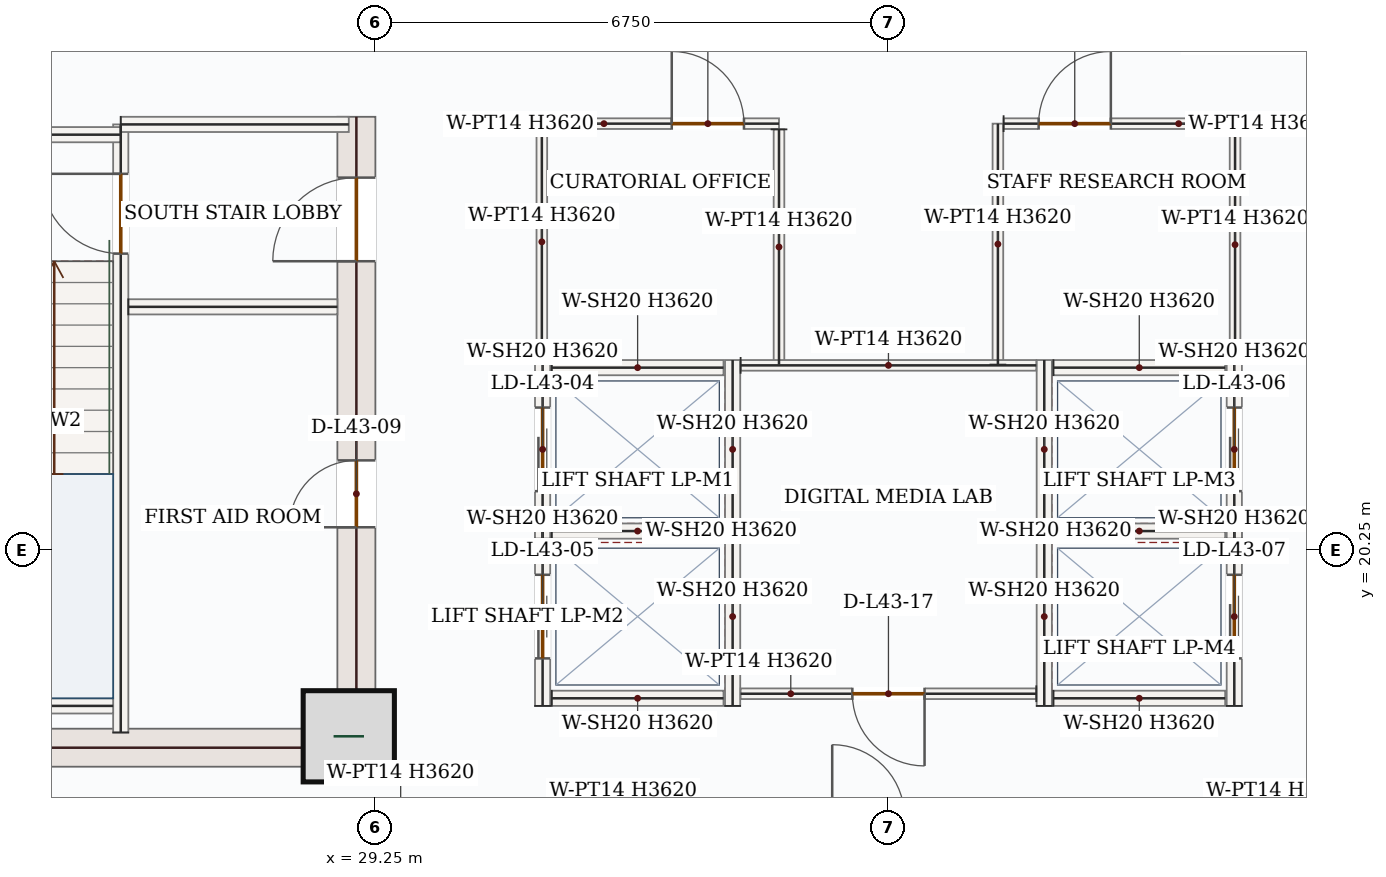
"""IFC4 building model, lengths in metres.
Left out: names, types, materials, properties, quantities, classifications, styles, units other than length and angle.
Written with IfcOpenShell. Run it as: python <this file> out.ifc"""

import sys

from ifc_helpers import new_model, si_unit, direction, frame, frame_2d, origin, origin_2d, place, context, subcontext, project, spatial, rectangle, extrude, source, transform, mapped, element, fill, save


model = new_model("IFC4")
c1 = context("Model", 3, precision=1e-05, world=origin(), true_north=direction((0.0, 1.0)))
c2 = subcontext(c1, "Body", "Model", "MODEL_VIEW")
j1 = project(units=[si_unit("LENGTHUNIT", "METRE"), si_unit("PLANEANGLEUNIT", "RADIAN")], contexts=[c1])
p1 = place(None, origin())
s1 = spatial("IfcSite", under=j1, at=p1, CompositionType="ELEMENT")
p2 = place(p1, origin())
s2 = spatial("IfcBuilding", under=s1, at=p2, CompositionType="ELEMENT")
p3 = place(p2, frame((0.0, 0.0, 186.3)))
s3 = spatial("IfcBuildingStorey", under=s2, at=p3, CompositionType="ELEMENT", Elevation=186.3)
p4 = place(p3, frame((29.0, 17.4, 0.0), z_axis=(0.0, 0.0, 1.0), x_axis=(0.0, 1.0, 0.0)))
e1 = element("IfcWall", 1, at=p4, inside=s3, PredefinedType="SHEAR", context=c2, shape_type="SweptSolid", body=[
    extrude(rectangle(XDim=8.55, YDim=0.5, at=frame_2d((4.275, 0.0))), origin(), (0.0, 0.0, 1.0), 3.62),
])
p5 = place(p4, frame((6.65, 0.0, 0.0)))
e2 = element("IfcOpeningElement", 2, at=p5, cuts=e1, PredefinedType="OPENING", context=c2, shape_type="SweptSolid", body=[
    extrude(rectangle(XDim=1.1, YDim=2.2, at=frame_2d((0.55, 1.1))), frame((0.0, 0.26, 0.0), z_axis=(0.0, -1.0, 0.0), x_axis=(1.0, 0.0, 0.0)), (0.0, 0.0, 1.0), 0.52),
])
p6 = place(p4, frame((3.15, 0.0, 0.0)))
e3 = element("IfcOpeningElement", 3, at=p6, cuts=e1, PredefinedType="OPENING", context=c2, shape_type="SweptSolid", body=[
    extrude(rectangle(XDim=0.88, YDim=2.1, at=frame_2d((0.44, 1.05))), frame((0.0, 0.26, 0.0), z_axis=(0.0, -1.0, 0.0), x_axis=(1.0, 0.0, 0.0)), (0.0, 0.0, 1.0), 0.52),
])
m1 = source(origin(), c2, "Body", "SweptSolid", [
    extrude(rectangle(XDim=7.0, YDim=0.5, at=frame_2d((3.5, 0.0))), origin(), (0.0, 0.0, 1.0), 3.62),
])
p7 = place(p3, frame((21.75, 17.65, 0.0), z_axis=(0.0, 0.0, 1.0), x_axis=(1.0, 0.0, 0.0)))
e4 = element("IfcWall", 4, at=p7, inside=s3, PredefinedType="SHEAR", context=c2, shape_type="MappedRepresentation", body=[
    mapped(m1, transform((0.0, 0.0, 0.0), x_axis=(1.0, 0.0, 0.0), y_axis=(0.0, 1.0, 0.0), z_axis=(0.0, 0.0, 1.0), scale=1.0)),
])
m2 = source(origin(), c2, "Body", "SweptSolid", [
    extrude(rectangle(XDim=1.2, YDim=1.2, at=origin_2d()), origin(), (0.0, 0.0, 1.0), 3.9),
])
p8 = place(p3, frame((28.9, 17.8, 0.0), z_axis=(0.0, 0.0, 1.0), x_axis=(1.0, 0.0, 0.0)))
e5 = element("IfcColumn", 5, at=p8, inside=s3, PredefinedType="COLUMN", context=c2, shape_type="MappedRepresentation", body=[
    mapped(m2, transform((0.0, 0.0, 0.0), x_axis=(1.0, 0.0, 0.0), y_axis=(0.0, 1.0, 0.0), z_axis=(0.0, 0.0, 1.0), scale=1.0)),
])
p9 = place(p3, frame((25.9, 17.85, 0.0), z_axis=(0.0, 0.0, 1.0), x_axis=(0.0, 1.0, 0.0)))
e6 = element("IfcWall", 6, at=p9, inside=s3, PredefinedType="SOLIDWALL", context=c2, shape_type="SweptSolid", body=[
    extrude(rectangle(XDim=8.0, YDim=0.2, at=frame_2d((4.0, 0.0))), origin(), (0.0, 0.0, 1.0), 3.62),
])
p10 = place(p9, frame((6.3, 0.0, 0.0)))
e7 = element("IfcOpeningElement", 7, at=p10, cuts=e6, PredefinedType="OPENING", context=c2, shape_type="SweptSolid", body=[
    extrude(rectangle(XDim=1.05, YDim=2.15, at=frame_2d((0.525, 1.075))), frame((0.0, 0.11, 0.0), z_axis=(0.0, -1.0, 0.0), x_axis=(1.0, 0.0, 0.0)), (0.0, 0.0, 1.0), 0.22),
])
m3 = source(origin(), c2, "Body", "SweptSolid", [
    extrude(rectangle(XDim=4.25, YDim=0.2, at=frame_2d((2.125, 0.0))), origin(), (0.0, 0.0, 1.0), 3.62),
])
p11 = place(p3, frame((21.65, 25.715, 0.0), z_axis=(0.0, 0.0, 1.0), x_axis=(1.0, 0.0, 0.0)))
e8 = element("IfcWall", 8, at=p11, inside=s3, PredefinedType="SOLIDWALL", context=c2, shape_type="MappedRepresentation", body=[
    mapped(m3, transform((0.0, 0.0, 0.0), x_axis=(1.0, 0.0, 0.0), y_axis=(0.0, 1.0, 0.0), z_axis=(0.0, 0.0, 1.0), scale=1.0)),
])
m4 = source(origin(), c2, "Body", "SweptSolid", [
    extrude(rectangle(XDim=3.0, YDim=0.2, at=frame_2d((1.5, 0.0))), origin(), (0.0, 0.0, 1.0), 3.62),
])
p12 = place(p3, frame((25.9, 25.85, 0.0), z_axis=(0.0, 0.0, 1.0), x_axis=(1.0, 0.0, 0.0)))
e9 = element("IfcWall", 9, at=p12, inside=s3, PredefinedType="SOLIDWALL", context=c2, shape_type="MappedRepresentation", body=[
    mapped(m4, transform((0.0, 0.0, 0.0), x_axis=(1.0, 0.0, 0.0), y_axis=(0.0, 1.0, 0.0), z_axis=(0.0, 0.0, 1.0), scale=1.0)),
])
m5 = source(origin(), c2, "Body", "SweptSolid", [
    extrude(rectangle(XDim=3.25, YDim=0.2, at=frame_2d((1.625, 0.0))), origin(), (0.0, 0.0, 1.0), 3.62),
])
p13 = place(p3, frame((22.55, 18.2, 0.0), z_axis=(0.0, 0.0, 1.0), x_axis=(1.0, 0.0, 0.0)))
e10 = element("IfcWall", 10, at=p13, inside=s3, PredefinedType="SOLIDWALL", context=c2, shape_type="MappedRepresentation", body=[
    mapped(m5, transform((0.0, 0.0, 0.0), x_axis=(1.0, 0.0, 0.0), y_axis=(0.0, 1.0, 0.0), z_axis=(0.0, 0.0, 1.0), scale=1.0)),
])
m6 = source(origin(), c2, "Body", "SweptSolid", [
    extrude(rectangle(XDim=2.75, YDim=0.2, at=frame_2d((1.375, 0.0))), origin(), (0.0, 0.0, 1.0), 3.62),
])
p14 = place(p3, frame((26.0, 23.45, 0.0), z_axis=(0.0, 0.0, 1.0), x_axis=(1.0, 0.0, 0.0)))
e11 = element("IfcWall", 11, at=p14, inside=s3, PredefinedType="SOLIDWALL", context=c2, shape_type="MappedRepresentation", body=[
    mapped(m6, transform((0.0, 0.0, 0.0), x_axis=(1.0, 0.0, 0.0), y_axis=(0.0, 1.0, 0.0), z_axis=(0.0, 0.0, 1.0), scale=1.0)),
])
p15 = place(p3, frame((31.45, 20.4, 0.0), z_axis=(0.0, 0.0, 1.0), x_axis=(0.0, 1.0, 0.0)))
e12 = element("IfcWall", 12, at=p15, inside=s3, PredefinedType="SOLIDWALL", context=c2, shape_type="SweptSolid", body=[
    extrude(rectangle(XDim=2.35, YDim=0.2, at=frame_2d((1.175, 0.0))), origin(), (0.0, 0.0, 1.0), 3.62),
])
p16 = place(p15, frame((0.625, 0.0, 0.0)))
e13 = element("IfcOpeningElement", 13, at=p16, cuts=e12, PredefinedType="OPENING", context=c2, shape_type="SweptSolid", body=[
    extrude(rectangle(XDim=1.1, YDim=2.15, at=frame_2d((0.55, 1.075))), frame((0.0, 0.11, 0.0), z_axis=(0.0, -1.0, 0.0), x_axis=(1.0, 0.0, 0.0)), (0.0, 0.0, 1.0), 0.22),
])
m7 = source(origin(), c2, "Body", "SweptSolid", [
    extrude(rectangle(XDim=2.35, YDim=0.2, at=frame_2d((1.175, 0.0))), origin(), (0.0, 0.0, 1.0), 3.62),
])
p17 = place(p3, frame((33.95, 20.4, 0.0), z_axis=(0.0, 0.0, 1.0), x_axis=(0.0, 1.0, 0.0)))
e14 = element("IfcWall", 14, at=p17, inside=s3, PredefinedType="SOLIDWALL", context=c2, shape_type="MappedRepresentation", body=[
    mapped(m7, transform((0.0, 0.0, 0.0), x_axis=(1.0, 0.0, 0.0), y_axis=(0.0, 1.0, 0.0), z_axis=(0.0, 0.0, 1.0), scale=1.0)),
])
m8 = source(origin(), c2, "Body", "SweptSolid", [
    extrude(rectangle(XDim=2.26, YDim=0.2, at=frame_2d((1.13, 0.0))), origin(), (0.0, 0.0, 1.0), 3.62),
])
for number, where, z_axis, x_axis in (
    (15, (31.57, 20.5, 0.0), (0.0, 0.0, 1.0), (1.0, 0.0, 0.0)),
    (16, (31.57, 22.65, 0.0), (0.0, 0.0, 1.0), (1.0, 0.0, 0.0)),
):
    element("IfcWall", number, at=place(p3, frame(where, z_axis=z_axis, x_axis=x_axis)), inside=s3, PredefinedType="SOLIDWALL", context=c2, shape_type="MappedRepresentation", body=[
        mapped(m8, transform((0.0, 0.0, 0.0), x_axis=(1.0, 0.0, 0.0), y_axis=(0.0, 1.0, 0.0), z_axis=(0.0, 0.0, 1.0), scale=1.0)),
    ])
p18 = place(p3, frame((31.45, 18.2, 0.0), z_axis=(0.0, 0.0, 1.0), x_axis=(0.0, 1.0, 0.0)))
e17 = element("IfcWall", 17, at=p18, inside=s3, PredefinedType="SOLIDWALL", context=c2, shape_type="SweptSolid", body=[
    extrude(rectangle(XDim=2.35, YDim=0.2, at=frame_2d((1.175, 0.0))), origin(), (0.0, 0.0, 1.0), 3.62),
])
p19 = place(p18, frame((0.625, 0.0, 0.0)))
e18 = element("IfcOpeningElement", 18, at=p19, cuts=e17, PredefinedType="OPENING", context=c2, shape_type="SweptSolid", body=[
    extrude(rectangle(XDim=1.1, YDim=2.15, at=frame_2d((0.55, 1.075))), frame((0.0, 0.11, 0.0), z_axis=(0.0, -1.0, 0.0), x_axis=(1.0, 0.0, 0.0)), (0.0, 0.0, 1.0), 0.22),
])
p20 = place(p3, frame((33.95, 18.2, 0.0), z_axis=(0.0, 0.0, 1.0), x_axis=(0.0, 1.0, 0.0)))
e19 = element("IfcWall", 19, at=p20, inside=s3, PredefinedType="SOLIDWALL", context=c2, shape_type="MappedRepresentation", body=[
    mapped(m7, transform((0.0, 0.0, 0.0), x_axis=(1.0, 0.0, 0.0), y_axis=(0.0, 1.0, 0.0), z_axis=(0.0, 0.0, 1.0), scale=1.0)),
])
p21 = place(p3, frame((31.57, 18.3, 0.0), z_axis=(0.0, 0.0, 1.0), x_axis=(1.0, 0.0, 0.0)))
e20 = element("IfcWall", 20, at=p21, inside=s3, PredefinedType="SOLIDWALL", context=c2, shape_type="MappedRepresentation", body=[
    mapped(m8, transform((0.0, 0.0, 0.0), x_axis=(1.0, 0.0, 0.0), y_axis=(0.0, 1.0, 0.0), z_axis=(0.0, 0.0, 1.0), scale=1.0)),
])
p22 = place(p3, frame((38.05, 20.4, 0.0), z_axis=(0.0, 0.0, 1.0), x_axis=(0.0, 1.0, 0.0)))
e21 = element("IfcWall", 21, at=p22, inside=s3, PredefinedType="SOLIDWALL", context=c2, shape_type="MappedRepresentation", body=[
    mapped(m7, transform((0.0, 0.0, 0.0), x_axis=(1.0, 0.0, 0.0), y_axis=(0.0, 1.0, 0.0), z_axis=(0.0, 0.0, 1.0), scale=1.0)),
])
p23 = place(p3, frame((40.55, 20.4, 0.0), z_axis=(0.0, 0.0, 1.0), x_axis=(0.0, 1.0, 0.0)))
e22 = element("IfcWall", 22, at=p23, inside=s3, PredefinedType="SOLIDWALL", context=c2, shape_type="SweptSolid", body=[
    extrude(rectangle(XDim=2.35, YDim=0.2, at=frame_2d((1.175, 0.0))), origin(), (0.0, 0.0, 1.0), 3.62),
])
p24 = place(p23, frame((0.625, 0.0, 0.0)))
e23 = element("IfcOpeningElement", 23, at=p24, cuts=e22, PredefinedType="OPENING", context=c2, shape_type="SweptSolid", body=[
    extrude(rectangle(XDim=1.1, YDim=2.15, at=frame_2d((0.55, 1.075))), frame((0.0, 0.11, 0.0), z_axis=(0.0, -1.0, 0.0), x_axis=(1.0, 0.0, 0.0)), (0.0, 0.0, 1.0), 0.22),
])
for number, where, z_axis, x_axis in (
    (24, (38.17, 20.5, 0.0), (0.0, 0.0, 1.0), (1.0, 0.0, 0.0)),
    (25, (38.17, 22.65, 0.0), (0.0, 0.0, 1.0), (1.0, 0.0, 0.0)),
):
    element("IfcWall", number, at=place(p3, frame(where, z_axis=z_axis, x_axis=x_axis)), inside=s3, PredefinedType="SOLIDWALL", context=c2, shape_type="MappedRepresentation", body=[
        mapped(m8, transform((0.0, 0.0, 0.0), x_axis=(1.0, 0.0, 0.0), y_axis=(0.0, 1.0, 0.0), z_axis=(0.0, 0.0, 1.0), scale=1.0)),
    ])
p25 = place(p3, frame((38.05, 18.2, 0.0), z_axis=(0.0, 0.0, 1.0), x_axis=(0.0, 1.0, 0.0)))
e26 = element("IfcWall", 26, at=p25, inside=s3, PredefinedType="SOLIDWALL", context=c2, shape_type="MappedRepresentation", body=[
    mapped(m7, transform((0.0, 0.0, 0.0), x_axis=(1.0, 0.0, 0.0), y_axis=(0.0, 1.0, 0.0), z_axis=(0.0, 0.0, 1.0), scale=1.0)),
])
p26 = place(p3, frame((40.55, 18.2, 0.0), z_axis=(0.0, 0.0, 1.0), x_axis=(0.0, 1.0, 0.0)))
e27 = element("IfcWall", 27, at=p26, inside=s3, PredefinedType="SOLIDWALL", context=c2, shape_type="SweptSolid", body=[
    extrude(rectangle(XDim=2.35, YDim=0.2, at=frame_2d((1.175, 0.0))), origin(), (0.0, 0.0, 1.0), 3.62),
])
p27 = place(p26, frame((0.625, 0.0, 0.0)))
e28 = element("IfcOpeningElement", 28, at=p27, cuts=e27, PredefinedType="OPENING", context=c2, shape_type="SweptSolid", body=[
    extrude(rectangle(XDim=1.1, YDim=2.15, at=frame_2d((0.55, 1.075))), frame((0.0, 0.11, 0.0), z_axis=(0.0, -1.0, 0.0), x_axis=(1.0, 0.0, 0.0)), (0.0, 0.0, 1.0), 0.22),
])
p28 = place(p3, frame((38.17, 18.3, 0.0), z_axis=(0.0, 0.0, 1.0), x_axis=(1.0, 0.0, 0.0)))
e29 = element("IfcWall", 29, at=p28, inside=s3, PredefinedType="SOLIDWALL", context=c2, shape_type="MappedRepresentation", body=[
    mapped(m8, transform((0.0, 0.0, 0.0), x_axis=(1.0, 0.0, 0.0), y_axis=(0.0, 1.0, 0.0), z_axis=(0.0, 0.0, 1.0), scale=1.0)),
])
m9 = source(origin(), c2, "Body", "SweptSolid", [
    extrude(rectangle(XDim=3.11, YDim=0.14, at=frame_2d((1.555, 0.0))), origin(), (0.0, 0.0, 1.0), 3.62),
])
p29 = place(p3, frame((31.44, 22.75, 0.0), z_axis=(0.0, 0.0, 1.0), x_axis=(0.0, 1.0, 0.0)))
e30 = element("IfcWall", 30, at=p29, inside=s3, PredefinedType="PARTITIONING", context=c2, shape_type="MappedRepresentation", body=[
    mapped(m9, transform((0.0, 0.0, 0.0), x_axis=(1.0, 0.0, 0.0), y_axis=(0.0, 1.0, 0.0), z_axis=(0.0, 0.0, 1.0), scale=1.0)),
])
p30 = place(p3, frame((31.515, 25.86, 0.0), z_axis=(0.0, 0.0, 1.0), x_axis=(1.0, 0.0, 0.0)))
e31 = element("IfcWall", 31, at=p30, inside=s3, PredefinedType="PARTITIONING", context=c2, shape_type="SweptSolid", body=[
    extrude(rectangle(XDim=3.045, YDim=0.14, at=frame_2d((1.522, 0.0))), origin(), (0.0, 0.0, 1.0), 3.62),
])
p31 = place(p30, frame((1.634, 0.0, 0.0)))
e32 = element("IfcOpeningElement", 32, at=p31, cuts=e31, PredefinedType="OPENING", context=c2, shape_type="SweptSolid", body=[
    extrude(rectangle(XDim=0.95, YDim=2.15, at=frame_2d((0.475, 1.075))), frame((0.0, 0.08, 0.0), z_axis=(0.0, -1.0, 0.0), x_axis=(1.0, 0.0, 0.0)), (0.0, 0.0, 1.0), 0.16),
])
m10 = source(origin(), c2, "Body", "SweptSolid", [
    extrude(rectangle(XDim=3.095, YDim=0.14, at=frame_2d((1.547, 0.0))), origin(), (0.0, 0.0, 1.0), 3.62),
])
p32 = place(p3, frame((34.56, 25.785, 0.0), z_axis=(0.0, 0.0, 1.0), x_axis=(0.0, -1.0, 0.0)))
e33 = element("IfcWall", 33, at=p32, inside=s3, PredefinedType="PARTITIONING", context=c2, shape_type="MappedRepresentation", body=[
    mapped(m10, transform((0.0, 0.0, 0.0), x_axis=(1.0, 0.0, 0.0), y_axis=(0.0, 1.0, 0.0), z_axis=(0.0, 0.0, 1.0), scale=1.0)),
])
m11 = source(origin(), c2, "Body", "SweptSolid", [
    extrude(rectangle(XDim=3.17, YDim=0.14, at=frame_2d((1.585, 0.0))), origin(), (0.0, 0.0, 1.0), 3.62),
])
p33 = place(p3, frame((37.44, 22.69, 0.0), z_axis=(0.0, 0.0, 1.0), x_axis=(0.0, 1.0, 0.0)))
e34 = element("IfcWall", 34, at=p33, inside=s3, PredefinedType="PARTITIONING", context=c2, shape_type="MappedRepresentation", body=[
    mapped(m11, transform((0.0, 0.0, 0.0), x_axis=(1.0, 0.0, 0.0), y_axis=(0.0, 1.0, 0.0), z_axis=(0.0, 0.0, 1.0), scale=1.0)),
])
p34 = place(p3, frame((37.515, 25.86, 0.0), z_axis=(0.0, 0.0, 1.0), x_axis=(1.0, 0.0, 0.0)))
e35 = element("IfcWall", 35, at=p34, inside=s3, PredefinedType="PARTITIONING", context=c2, shape_type="SweptSolid", body=[
    extrude(rectangle(XDim=3.045, YDim=0.14, at=frame_2d((1.522, 0.0))), origin(), (0.0, 0.0, 1.0), 3.62),
])
p35 = place(p34, frame((0.461, 0.0, 0.0)))
e36 = element("IfcOpeningElement", 36, at=p35, cuts=e35, PredefinedType="OPENING", context=c2, shape_type="SweptSolid", body=[
    extrude(rectangle(XDim=0.95, YDim=2.15, at=frame_2d((0.475, 1.075))), frame((0.0, 0.08, 0.0), z_axis=(0.0, -1.0, 0.0), x_axis=(1.0, 0.0, 0.0)), (0.0, 0.0, 1.0), 0.16),
])
m12 = source(origin(), c2, "Body", "SweptSolid", [
    extrude(rectangle(XDim=3.035, YDim=0.14, at=frame_2d((1.518, 0.0))), origin(), (0.0, 0.0, 1.0), 3.62),
])
p36 = place(p3, frame((40.56, 25.785, 0.0), z_axis=(0.0, 0.0, 1.0), x_axis=(0.0, -1.0, 0.0)))
e37 = element("IfcWall", 37, at=p36, inside=s3, PredefinedType="PARTITIONING", context=c2, shape_type="MappedRepresentation", body=[
    mapped(m12, transform((0.0, 0.0, 0.0), x_axis=(1.0, 0.0, 0.0), y_axis=(0.0, 1.0, 0.0), z_axis=(0.0, 0.0, 1.0), scale=1.0)),
])
m13 = source(origin(), c2, "Body", "SweptSolid", [
    extrude(rectangle(XDim=3.89, YDim=0.14, at=frame_2d((1.945, 0.0))), origin(), (0.0, 0.0, 1.0), 3.62),
])
p37 = place(p3, frame((34.055, 22.68, 0.0), z_axis=(0.0, 0.0, 1.0), x_axis=(1.0, 0.0, 0.0)))
e38 = element("IfcWall", 38, at=p37, inside=s3, PredefinedType="PARTITIONING", context=c2, shape_type="MappedRepresentation", body=[
    mapped(m13, transform((0.0, 0.0, 0.0), x_axis=(1.0, 0.0, 0.0), y_axis=(0.0, 1.0, 0.0), z_axis=(0.0, 0.0, 1.0), scale=1.0)),
])
p38 = place(p3, frame((37.945, 18.36, 0.0), z_axis=(0.0, 0.0, 1.0), x_axis=(-1.0, 0.0, 0.0)))
e39 = element("IfcWall", 39, at=p38, inside=s3, PredefinedType="PARTITIONING", context=c2, shape_type="SweptSolid", body=[
    extrude(rectangle(XDim=3.89, YDim=0.14, at=frame_2d((1.945, 0.0))), origin(), (0.0, 0.0, 1.0), 3.62),
])
p39 = place(p38, frame((1.47, 0.0, 0.0)))
e40 = element("IfcOpeningElement", 40, at=p39, cuts=e39, PredefinedType="OPENING", context=c2, shape_type="SweptSolid", body=[
    extrude(rectangle(XDim=0.95, YDim=2.15, at=frame_2d((0.475, 1.075))), frame((0.0, 0.08, 0.0), z_axis=(0.0, -1.0, 0.0), x_axis=(1.0, 0.0, 0.0)), (0.0, 0.0, 1.0), 0.16),
])
m14 = source(origin(), c2, "Body", "SweptSolid", [
    extrude(rectangle(XDim=1.05, YDim=2.15, at=frame_2d((0.525, 1.075))), frame((0.0, 0.025, 0.0), z_axis=(0.0, -1.0, 0.0), x_axis=(1.0, 0.0, 0.0)), (0.0, 0.0, 1.0), 0.05),
])
p40 = place(p10, origin())
e41 = element("IfcDoor", 41, at=p40, inside=s3, OperationType="SINGLE_SWING_RIGHT", PredefinedType="DOOR", context=c2, shape_type="MappedRepresentation", body=[
    mapped(m14, transform((0.0, 0.0, 0.0), x_axis=(1.0, 0.0, 0.0), y_axis=(0.0, 1.0, 0.0), z_axis=(0.0, 0.0, 1.0), scale=1.0)),
])
fill(e7, e41)
m15 = source(origin(), c2, "Body", "SweptSolid", [
    extrude(rectangle(XDim=1.1, YDim=2.2, at=frame_2d((0.55, 1.1))), frame((0.0, 0.025, 0.0), z_axis=(0.0, -1.0, 0.0), x_axis=(1.0, 0.0, 0.0)), (0.0, 0.0, 1.0), 0.05),
])
p41 = place(p5, origin())
e42 = element("IfcDoor", 42, at=p41, inside=s3, OperationType="SINGLE_SWING_LEFT", PredefinedType="DOOR", context=c2, shape_type="MappedRepresentation", body=[
    mapped(m15, transform((0.0, 0.0, 0.0), x_axis=(1.0, 0.0, 0.0), y_axis=(0.0, 1.0, 0.0), z_axis=(0.0, 0.0, 1.0), scale=1.0)),
])
fill(e2, e42)
m16 = source(origin(), c2, "Body", "SweptSolid", [
    extrude(rectangle(XDim=0.88, YDim=2.1, at=frame_2d((0.44, 1.05))), frame((0.0, 0.025, 0.0), z_axis=(0.0, -1.0, 0.0), x_axis=(1.0, 0.0, 0.0)), (0.0, 0.0, 1.0), 0.05),
])
p42 = place(p6, origin())
e43 = element("IfcDoor", 43, at=p42, inside=s3, OperationType="SINGLE_SWING_LEFT", PredefinedType="DOOR", context=c2, shape_type="MappedRepresentation", body=[
    mapped(m16, transform((0.0, 0.0, 0.0), x_axis=(1.0, 0.0, 0.0), y_axis=(0.0, 1.0, 0.0), z_axis=(0.0, 0.0, 1.0), scale=1.0)),
])
fill(e3, e43)
m17 = source(origin(), c2, "Body", "SweptSolid", [
    extrude(rectangle(XDim=1.1, YDim=2.15, at=frame_2d((0.55, 1.075))), frame((0.0, 0.025, 0.0), z_axis=(0.0, -1.0, 0.0), x_axis=(1.0, 0.0, 0.0)), (0.0, 0.0, 1.0), 0.05),
])
p43 = place(p16, origin())
e44 = element("IfcDoor", 44, at=p43, inside=s3, OperationType="DOUBLE_DOOR_SLIDING", PredefinedType="DOOR", context=c2, shape_type="MappedRepresentation", body=[
    mapped(m17, transform((0.0, 0.0, 0.0), x_axis=(1.0, 0.0, 0.0), y_axis=(0.0, 1.0, 0.0), z_axis=(0.0, 0.0, 1.0), scale=1.0)),
])
fill(e13, e44)
p44 = place(p19, origin())
e45 = element("IfcDoor", 45, at=p44, inside=s3, OperationType="DOUBLE_DOOR_SLIDING", PredefinedType="DOOR", context=c2, shape_type="MappedRepresentation", body=[
    mapped(m17, transform((0.0, 0.0, 0.0), x_axis=(1.0, 0.0, 0.0), y_axis=(0.0, 1.0, 0.0), z_axis=(0.0, 0.0, 1.0), scale=1.0)),
])
fill(e18, e45)
p45 = place(p24, origin())
e46 = element("IfcDoor", 46, at=p45, inside=s3, OperationType="DOUBLE_DOOR_SLIDING", PredefinedType="DOOR", context=c2, shape_type="MappedRepresentation", body=[
    mapped(m17, transform((0.0, 0.0, 0.0), x_axis=(1.0, 0.0, 0.0), y_axis=(0.0, 1.0, 0.0), z_axis=(0.0, 0.0, 1.0), scale=1.0)),
])
fill(e23, e46)
p46 = place(p27, origin())
e47 = element("IfcDoor", 47, at=p46, inside=s3, OperationType="DOUBLE_DOOR_SLIDING", PredefinedType="DOOR", context=c2, shape_type="MappedRepresentation", body=[
    mapped(m17, transform((0.0, 0.0, 0.0), x_axis=(1.0, 0.0, 0.0), y_axis=(0.0, 1.0, 0.0), z_axis=(0.0, 0.0, 1.0), scale=1.0)),
])
fill(e28, e47)
m18 = source(origin(), c2, "Body", "SweptSolid", [
    extrude(rectangle(XDim=0.95, YDim=2.15, at=frame_2d((0.475, 1.075))), frame((0.0, 0.025, 0.0), z_axis=(0.0, -1.0, 0.0), x_axis=(1.0, 0.0, 0.0)), (0.0, 0.0, 1.0), 0.05),
])
p47 = place(p31, origin())
e48 = element("IfcDoor", 48, at=p47, inside=s3, OperationType="SINGLE_SWING_LEFT", PredefinedType="DOOR", context=c2, shape_type="MappedRepresentation", body=[
    mapped(m18, transform((0.0, 0.0, 0.0), x_axis=(1.0, 0.0, 0.0), y_axis=(0.0, 1.0, 0.0), z_axis=(0.0, 0.0, 1.0), scale=1.0)),
])
fill(e32, e48)
p48 = place(p35, origin())
e49 = element("IfcDoor", 49, at=p48, inside=s3, OperationType="SINGLE_SWING_RIGHT", PredefinedType="DOOR", context=c2, shape_type="MappedRepresentation", body=[
    mapped(m18, transform((0.0, 0.0, 0.0), x_axis=(1.0, 0.0, 0.0), y_axis=(0.0, 1.0, 0.0), z_axis=(0.0, 0.0, 1.0), scale=1.0)),
])
fill(e36, e49)
p49 = place(p39, origin())
e50 = element("IfcDoor", 50, at=p49, inside=s3, OperationType="SINGLE_SWING_LEFT", PredefinedType="DOOR", context=c2, shape_type="MappedRepresentation", body=[
    mapped(m18, transform((0.0, 0.0, 0.0), x_axis=(1.0, 0.0, 0.0), y_axis=(0.0, 1.0, 0.0), z_axis=(0.0, 0.0, 1.0), scale=1.0)),
])
fill(e40, e50)
save(model, sys.argv[1])
